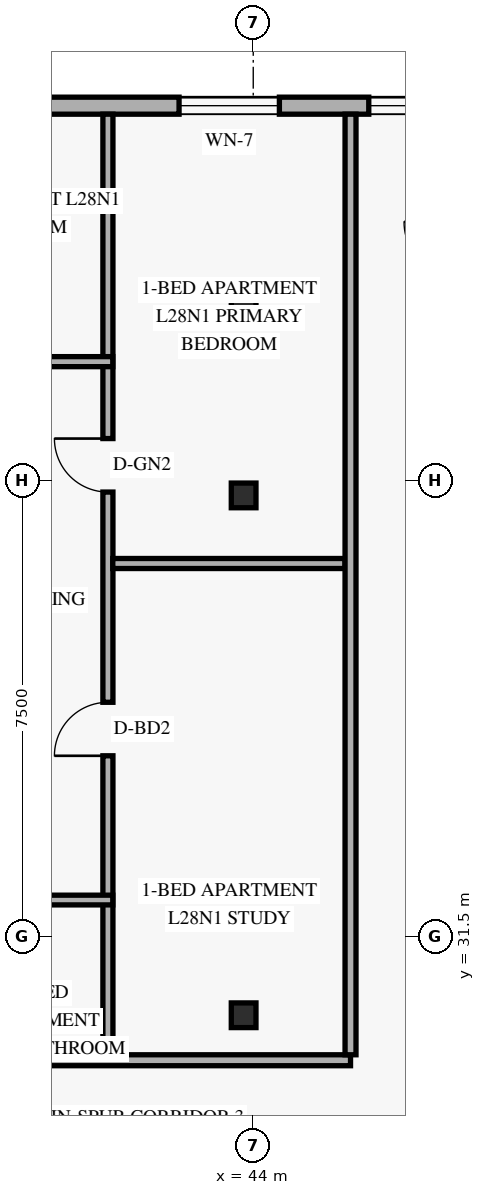
"""IFC4 building model, lengths in metres.
Left out: names, types, materials, properties, quantities, classifications, styles, units other than length and angle.
Written with IfcOpenShell. Run it as: python <this file> out.ifc"""

import sys

from ifc_helpers import new_model, si_unit, direction, frame, frame_2d, origin, origin_2d, place, context, subcontext, project, spatial, rectangle, hollow_rectangle, extrude, element, fill, save


model = new_model("IFC4")
c1 = context("Model", 3, precision=1e-05, world=origin(), true_north=direction((0.0, 1.0)))
c2 = subcontext(c1, "Body", "Model", "MODEL_VIEW")
j1 = project(units=[si_unit("LENGTHUNIT", "METRE"), si_unit("PLANEANGLEUNIT", "RADIAN")], contexts=[c1])
p1 = place(None, origin())
s1 = spatial("IfcSite", under=j1, at=p1, CompositionType="ELEMENT")
p2 = place(p1, origin())
s2 = spatial("IfcBuilding", under=s1, at=p2, CompositionType="ELEMENT")
p3 = place(p2, frame((0.0, 0.0, 109.8)))
s3 = spatial("IfcBuildingStorey", under=s2, at=p3, CompositionType="ELEMENT", Elevation=109.8)
for number, where, z_axis, x_axis in (
    (1, (43.779, 30.2, 0.0), (0.035, 0.0, 0.999), (0.0, 1.0, 0.0)),
    (2, (43.779, 38.75, 0.0), (0.035, 0.0, 0.999), (0.0, 1.0, 0.0)),
    (3, (43.779, 41.8, 0.0), (0.035, 0.0, 0.999), (0.0, 1.0, 0.0)),
):
    element("IfcColumn", number, at=place(p3, frame(where, z_axis=z_axis, x_axis=x_axis)), inside=s3, PredefinedType="COLUMN", context=c2, shape_type="SweptSolid", body=[
        extrude(hollow_rectangle(XDim=0.406, YDim=0.406, WallThickness=0.016, at=origin_2d()), origin(), (0.0, 0.0, 1.0), 3.602),
    ])
p4 = place(p3, frame((49.98, 45.16, 0.0), z_axis=(0.0, 0.0, 1.0), x_axis=(-1.0, 0.0, 0.0)))
e4 = element("IfcWall", 4, at=p4, inside=s3, PredefinedType="SOLIDWALL", context=c2, shape_type="SweptSolid", body=[
    extrude(rectangle(XDim=36.56, YDim=0.28, at=frame_2d((18.28, 0.0))), origin(), (0.0, 0.0, 1.0), 3.36),
])
p5 = place(p4, frame((30.99, 0.0, 0.85)))
e5 = element("IfcOpeningElement", 5, at=p5, cuts=e4, PredefinedType="OPENING", context=c2, shape_type="SweptSolid", body=[
    extrude(rectangle(XDim=1.65, YDim=1.6, at=frame_2d((0.825, 0.8))), frame((0.0, 0.15, 0.0), z_axis=(0.0, -1.0, 0.0), x_axis=(1.0, 0.0, 0.0)), (0.0, 0.0, 1.0), 0.3),
])
p6 = place(p4, frame((23.13, 0.0, 0.85)))
e6 = element("IfcOpeningElement", 6, at=p6, cuts=e4, PredefinedType="OPENING", context=c2, shape_type="SweptSolid", body=[
    extrude(rectangle(XDim=1.65, YDim=1.6, at=frame_2d((0.825, 0.8))), frame((0.0, 0.15, 0.0), z_axis=(0.0, -1.0, 0.0), x_axis=(1.0, 0.0, 0.0)), (0.0, 0.0, 1.0), 0.3),
])
p7 = place(p4, frame((16.245, 0.0, 0.85)))
e7 = element("IfcOpeningElement", 7, at=p7, cuts=e4, PredefinedType="OPENING", context=c2, shape_type="SweptSolid", body=[
    extrude(rectangle(XDim=1.65, YDim=1.6, at=frame_2d((0.825, 0.8))), frame((0.0, 0.15, 0.0), z_axis=(0.0, -1.0, 0.0), x_axis=(1.0, 0.0, 0.0)), (0.0, 0.0, 1.0), 0.3),
])
p8 = place(p4, frame((10.64, 0.0, 0.85)))
e8 = element("IfcOpeningElement", 8, at=p8, cuts=e4, PredefinedType="OPENING", context=c2, shape_type="SweptSolid", body=[
    extrude(rectangle(XDim=1.65, YDim=1.6, at=frame_2d((0.825, 0.8))), frame((0.0, 0.15, 0.0), z_axis=(0.0, -1.0, 0.0), x_axis=(1.0, 0.0, 0.0)), (0.0, 0.0, 1.0), 0.3),
])
p9 = place(p4, frame((5.55, 0.0, 0.85)))
e9 = element("IfcOpeningElement", 9, at=p9, cuts=e4, PredefinedType="OPENING", context=c2, shape_type="SweptSolid", body=[
    extrude(rectangle(XDim=1.65, YDim=1.6, at=frame_2d((0.825, 0.8))), frame((0.0, 0.15, 0.0), z_axis=(0.0, -1.0, 0.0), x_axis=(1.0, 0.0, 0.0)), (0.0, 0.0, 1.0), 0.3),
])
p10 = place(p4, frame((2.88, 0.0, 0.85)))
e10 = element("IfcOpeningElement", 10, at=p10, cuts=e4, PredefinedType="OPENING", context=c2, shape_type="SweptSolid", body=[
    extrude(rectangle(XDim=1.2, YDim=1.5, at=frame_2d((0.6, 0.75))), frame((0.0, 0.15, 0.0), z_axis=(0.0, -1.0, 0.0), x_axis=(1.0, 0.0, 0.0)), (0.0, 0.0, 1.0), 0.3),
])
p11 = place(p4, frame((0.465, 0.0, 0.85)))
e11 = element("IfcOpeningElement", 11, at=p11, cuts=e4, PredefinedType="OPENING", context=c2, shape_type="SweptSolid", body=[
    extrude(rectangle(XDim=1.65, YDim=1.6, at=frame_2d((0.825, 0.8))), frame((0.0, 0.15, 0.0), z_axis=(0.0, -1.0, 0.0), x_axis=(1.0, 0.0, 0.0)), (0.0, 0.0, 1.0), 0.3),
])
p12 = place(p3, frame((35.51, 29.46, 0.0), z_axis=(0.0, 0.0, 1.0), x_axis=(1.0, 0.0, 0.0)))
e12 = element("IfcWall", 12, at=p12, inside=s3, PredefinedType="STANDARD", context=c2, shape_type="SweptSolid", body=[
    extrude(rectangle(XDim=10.09, YDim=0.18, at=frame_2d((5.045, 0.0))), origin(), (0.0, 0.0, 1.0), 2.731),
])
p13 = place(p12, frame((0.32, 0.0, 0.0)))
e13 = element("IfcOpeningElement", 13, at=p13, cuts=e12, PredefinedType="OPENING", context=c2, shape_type="SweptSolid", body=[
    extrude(rectangle(XDim=0.92, YDim=2.15, at=frame_2d((0.46, 1.075))), frame((0.0, 0.1, 0.0), z_axis=(0.0, -1.0, 0.0), x_axis=(1.0, 0.0, 0.0)), (0.0, 0.0, 1.0), 0.2),
])
p14 = place(p3, frame((41.61, 29.55, 0.0), z_axis=(0.0, 0.0, 1.0), x_axis=(0.0, 1.0, 0.0)))
e14 = element("IfcWall", 14, at=p14, inside=s3, PredefinedType="PARTITIONING", context=c2, shape_type="SweptSolid", body=[
    extrude(rectangle(XDim=15.47, YDim=0.165, at=frame_2d((7.735, 0.0))), origin(), (0.0, 0.0, 1.0), 2.731),
])
p15 = place(p14, frame((4.917, 0.0, 0.0)))
e15 = element("IfcOpeningElement", 15, at=p15, cuts=e14, PredefinedType="OPENING", context=c2, shape_type="SweptSolid", body=[
    extrude(rectangle(XDim=0.88, YDim=2.14, at=frame_2d((0.44, 1.07))), frame((0.0, 0.093, 0.0), z_axis=(0.0, -1.0, 0.0), x_axis=(1.0, 0.0, 0.0)), (0.0, 0.0, 1.0), 0.185),
])
p16 = place(p14, frame((9.255, 0.0, 0.0)))
e16 = element("IfcOpeningElement", 16, at=p16, cuts=e14, PredefinedType="OPENING", context=c2, shape_type="SweptSolid", body=[
    extrude(rectangle(XDim=0.88, YDim=2.12, at=frame_2d((0.44, 1.06))), frame((0.0, 0.093, 0.0), z_axis=(0.0, -1.0, 0.0), x_axis=(1.0, 0.0, 0.0)), (0.0, 0.0, 1.0), 0.185),
])
p17 = place(p3, frame((36.98, 32.095, 0.0), z_axis=(0.0, 0.0, 1.0), x_axis=(1.0, 0.0, 0.0)))
e17 = element("IfcWall", 17, at=p17, inside=s3, PredefinedType="PLUMBINGWALL", context=c2, shape_type="SweptSolid", body=[
    extrude(rectangle(XDim=4.71, YDim=0.16, at=frame_2d((2.355, 0.0))), origin(), (0.0, 0.0, 1.0), 3.36),
])
p18 = place(p17, frame((0.38, 0.0, 0.0)))
e18 = element("IfcOpeningElement", 18, at=p18, cuts=e17, PredefinedType="OPENING", context=c2, shape_type="SweptSolid", body=[
    extrude(rectangle(XDim=0.88, YDim=2.12, at=frame_2d((0.44, 1.06))), frame((0.0, 0.09, 0.0), z_axis=(0.0, -1.0, 0.0), x_axis=(1.0, 0.0, 0.0)), (0.0, 0.0, 1.0), 0.18),
])
p19 = place(p17, frame((2.786, 0.0, 0.0)))
e19 = element("IfcOpeningElement", 19, at=p19, cuts=e17, PredefinedType="OPENING", context=c2, shape_type="SweptSolid", body=[
    extrude(rectangle(XDim=0.86, YDim=2.12, at=frame_2d((0.43, 1.06))), frame((0.0, 0.09, 0.0), z_axis=(0.0, -1.0, 0.0), x_axis=(1.0, 0.0, 0.0)), (0.0, 0.0, 1.0), 0.18),
])
p20 = place(p3, frame((35.51, 40.95, 0.0), z_axis=(0.0, 0.0, 1.0), x_axis=(1.0, 0.0, 0.0)))
e20 = element("IfcWall", 20, at=p20, inside=s3, PredefinedType="PARTITIONING", context=c2, shape_type="SweptSolid", body=[
    extrude(rectangle(XDim=6.18, YDim=0.165, at=frame_2d((3.09, 0.0))), origin(), (0.0, 0.0, 1.0), 3.36),
])
p21 = place(p20, frame((2.455, 0.0, 0.0)))
e21 = element("IfcOpeningElement", 21, at=p21, cuts=e20, PredefinedType="OPENING", context=c2, shape_type="SweptSolid", body=[
    extrude(rectangle(XDim=0.95, YDim=2.15, at=frame_2d((0.475, 1.075))), frame((0.0, 0.093, 0.0), z_axis=(0.0, -1.0, 0.0), x_axis=(1.0, 0.0, 0.0)), (0.0, 0.0, 1.0), 0.185),
])
p22 = place(p3, frame((41.69, 37.63, 0.0), z_axis=(0.0, 0.0, 1.0), x_axis=(1.0, 0.0, 0.0)))
e22 = element("IfcWall", 22, at=p22, inside=s3, PredefinedType="PARTITIONING", context=c2, shape_type="SweptSolid", body=[
    extrude(rectangle(XDim=3.82, YDim=0.165, at=frame_2d((1.91, 0.0))), origin(), (0.0, 0.0, 1.0), 2.731),
])
p23 = place(p3, frame((45.6, 29.55, 0.0), z_axis=(0.0, 0.0, 1.0), x_axis=(0.0, 1.0, 0.0)))
e23 = element("IfcWall", 23, at=p23, inside=s3, PredefinedType="STANDARD", context=c2, shape_type="SweptSolid", body=[
    extrude(rectangle(XDim=15.47, YDim=0.18, at=frame_2d((7.735, 0.0))), origin(), (0.0, 0.0, 1.0), 2.731),
])
p24 = place(p9, origin())
e24 = element("IfcWindow", 24, at=p24, inside=s3, PartitioningType="SINGLE_PANEL", PredefinedType="WINDOW", context=c2, shape_type="SweptSolid", body=[
    extrude(rectangle(XDim=1.65, YDim=1.6, at=frame_2d((0.825, 0.8))), frame((0.0, 0.03, 0.0), z_axis=(0.0, -1.0, 0.0), x_axis=(1.0, 0.0, 0.0)), (0.0, 0.0, 1.0), 0.06),
])
fill(e9, e24)
p25 = place(p10, origin())
e25 = element("IfcWindow", 25, at=p25, inside=s3, PartitioningType="SINGLE_PANEL", PredefinedType="WINDOW", context=c2, shape_type="SweptSolid", body=[
    extrude(rectangle(XDim=1.2, YDim=1.5, at=frame_2d((0.6, 0.75))), frame((0.0, 0.03, 0.0), z_axis=(0.0, -1.0, 0.0), x_axis=(1.0, 0.0, 0.0)), (0.0, 0.0, 1.0), 0.06),
])
fill(e10, e25)
p26 = place(p15, origin())
e26 = element("IfcDoor", 26, at=p26, inside=s3, OperationType="SINGLE_SWING_LEFT", PredefinedType="DOOR", context=c2, shape_type="SweptSolid", body=[
    extrude(rectangle(XDim=0.88, YDim=2.14, at=frame_2d((0.44, 1.07))), frame((0.0, 0.025, 0.0), z_axis=(0.0, -1.0, 0.0), x_axis=(1.0, 0.0, 0.0)), (0.0, 0.0, 1.0), 0.05),
])
fill(e15, e26)
p27 = place(p16, origin())
e27 = element("IfcDoor", 27, at=p27, inside=s3, OperationType="SINGLE_SWING_RIGHT", PredefinedType="DOOR", context=c2, shape_type="SweptSolid", body=[
    extrude(rectangle(XDim=0.88, YDim=2.12, at=frame_2d((0.44, 1.06))), frame((0.0, 0.025, 0.0), z_axis=(0.0, -1.0, 0.0), x_axis=(1.0, 0.0, 0.0)), (0.0, 0.0, 1.0), 0.05),
])
fill(e16, e27)
save(model, sys.argv[1])
